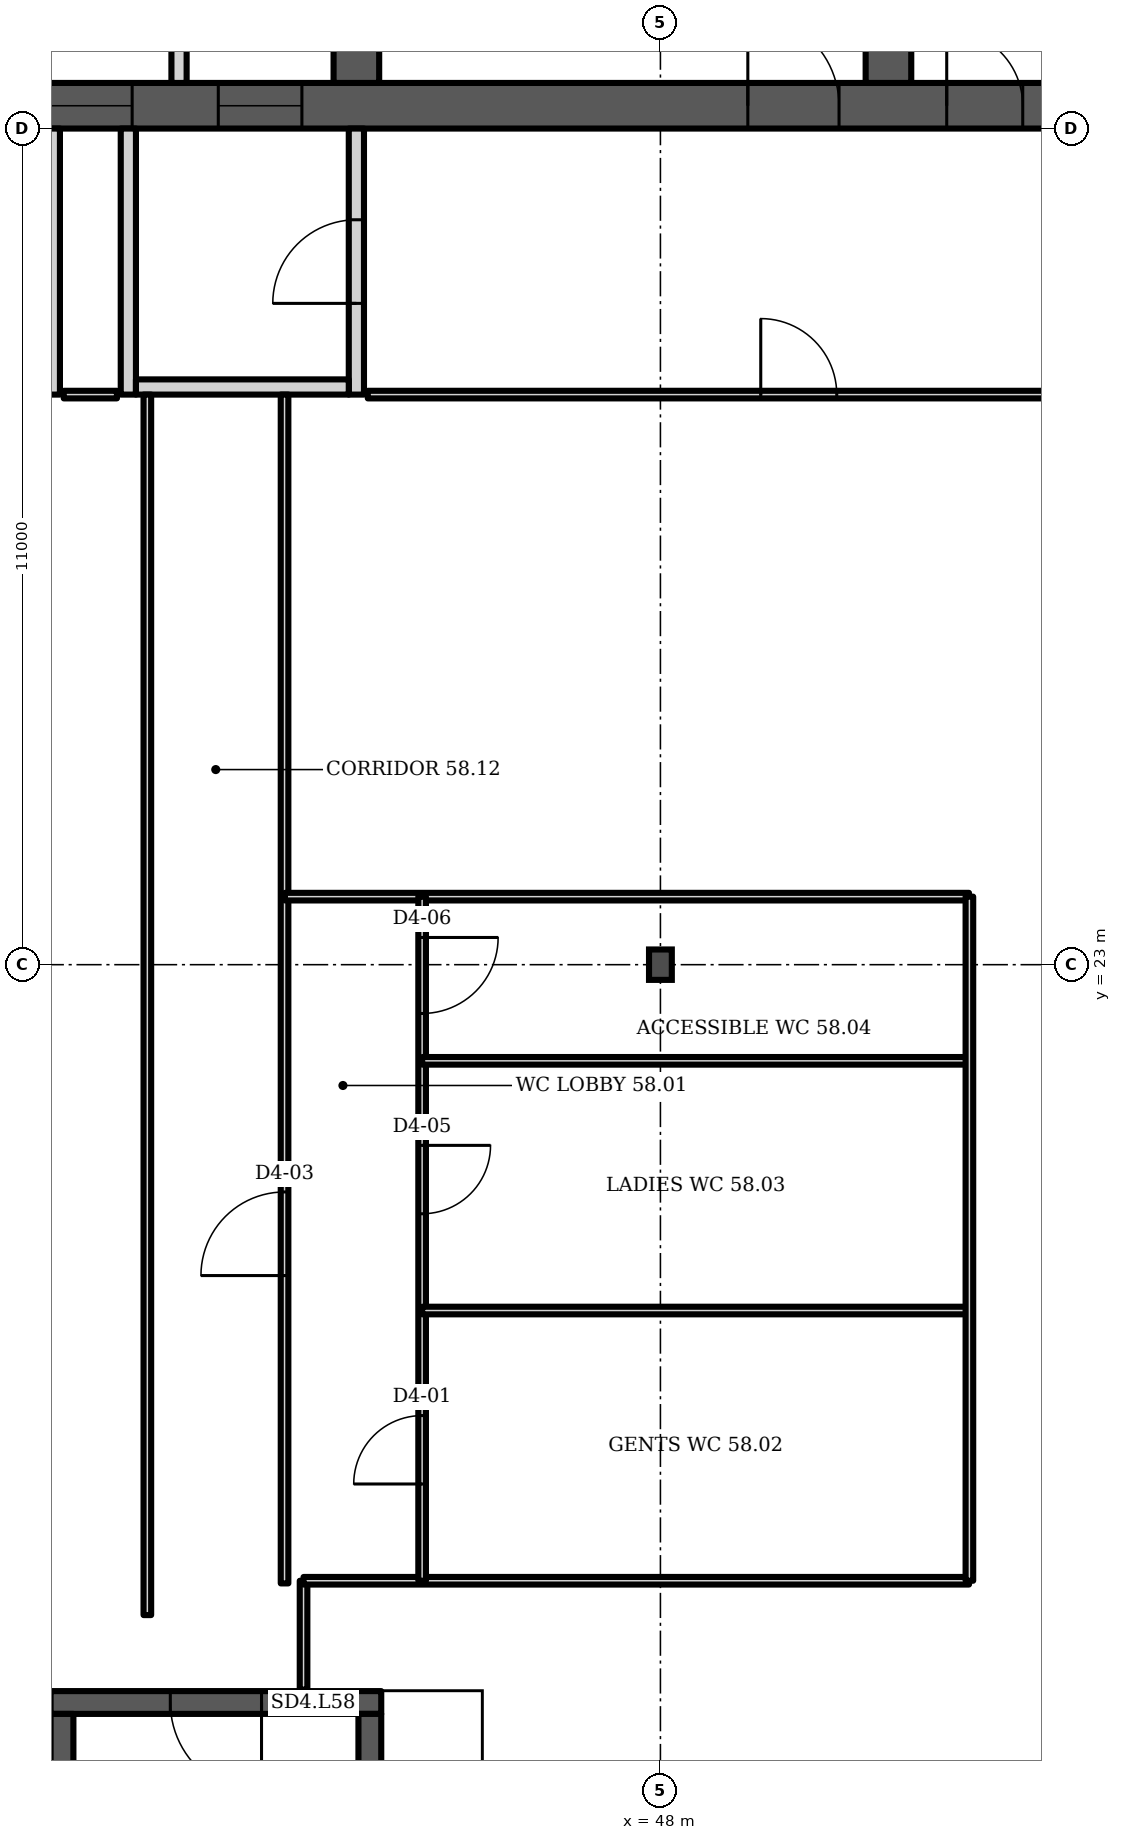
"""IFC4 building model, lengths in metres.
Left out: names, types, materials, properties, quantities, classifications, styles, units other than length and angle.
Written with IfcOpenShell. Run it as: python <this file> out.ifc"""

import sys

from ifc_helpers import new_model, si_unit, direction, frame, frame_2d, origin, origin_2d, place, context, subcontext, project, spatial, polyline, rectangle, i_section, outline, extrude, element, fill, save


model = new_model("IFC4")
c1 = context("Model", 3, precision=1e-05, world=origin(), true_north=direction((0.0, 1.0)))
c2 = subcontext(c1, "Body", "Model", "MODEL_VIEW")
j1 = project(units=[si_unit("LENGTHUNIT", "METRE"), si_unit("PLANEANGLEUNIT", "RADIAN")], contexts=[c1])
p1 = place(None, origin())
s1 = spatial("IfcSite", under=j1, at=p1, CompositionType="ELEMENT")
p2 = place(p1, origin())
s2 = spatial("IfcBuilding", under=s1, at=p2, CompositionType="ELEMENT")
p3 = place(p2, frame((0.0, 0.0, 232.3)))
s3 = spatial("IfcBuildingStorey", under=s2, at=p3, CompositionType="ELEMENT", Elevation=232.3)
p4 = place(p3, frame((23.0, 34.3, 0.0), z_axis=(0.0, 0.0, 1.0), x_axis=(1.0, 0.0, 0.0)))
e1 = element("IfcWall", 1, at=p4, inside=s3, PredefinedType="SHEAR", context=c2, shape_type="SweptSolid", body=[
    extrude(rectangle(XDim=35.0, YDim=0.6, at=frame_2d((17.5, 0.0))), origin(), (0.0, 0.0, 1.0), 3.6),
])
p5 = place(p4, frame((0.65, 0.0, 0.0)))
e2 = element("IfcOpeningElement", 2, at=p5, cuts=e1, PredefinedType="OPENING", context=c2, shape_type="SweptSolid", body=[
    extrude(rectangle(XDim=1.2, YDim=2.1, at=frame_2d((0.6, 1.05))), frame((0.0, 0.31, 0.0), z_axis=(0.0, -1.0, 0.0), x_axis=(1.0, 0.0, 0.0)), (0.0, 0.0, 1.0), 0.62),
])
p6 = place(p4, frame((7.717, 0.0, 0.0)))
e3 = element("IfcOpeningElement", 3, at=p6, cuts=e1, PredefinedType="OPENING", context=c2, shape_type="SweptSolid", body=[
    extrude(rectangle(XDim=1.1, YDim=2.1, at=frame_2d((0.55, 1.05))), frame((0.0, 0.31, 0.0), z_axis=(0.0, -1.0, 0.0), x_axis=(1.0, 0.0, 0.0)), (0.0, 0.0, 1.0), 0.62),
])
p7 = place(p4, frame((12.183, 0.0, 0.0)))
e4 = element("IfcOpeningElement", 4, at=p7, cuts=e1, PredefinedType="OPENING", context=c2, shape_type="SweptSolid", body=[
    extrude(rectangle(XDim=1.1, YDim=2.1, at=frame_2d((0.55, 1.05))), frame((0.0, 0.31, 0.0), z_axis=(0.0, -1.0, 0.0), x_axis=(1.0, 0.0, 0.0)), (0.0, 0.0, 1.0), 0.62),
])
p8 = place(p4, frame((9.8, 0.0, 0.0)))
e5 = element("IfcOpeningElement", 5, at=p8, cuts=e1, PredefinedType="OPENING", context=c2, shape_type="SweptSolid", body=[
    extrude(rectangle(XDim=1.4, YDim=2.1, at=frame_2d((0.7, 1.05))), frame((0.0, 0.31, 0.0), z_axis=(0.0, -1.0, 0.0), x_axis=(1.0, 0.0, 0.0)), (0.0, 0.0, 1.0), 0.62),
])
p9 = place(p4, frame((14.717, 0.0, 0.0)))
e6 = element("IfcOpeningElement", 6, at=p9, cuts=e1, PredefinedType="OPENING", context=c2, shape_type="SweptSolid", body=[
    extrude(rectangle(XDim=1.1, YDim=2.1, at=frame_2d((0.55, 1.05))), frame((0.0, 0.31, 0.0), z_axis=(0.0, -1.0, 0.0), x_axis=(1.0, 0.0, 0.0)), (0.0, 0.0, 1.0), 0.62),
])
p10 = place(p4, frame((16.95, 0.0, 0.0)))
e7 = element("IfcOpeningElement", 7, at=p10, cuts=e1, PredefinedType="OPENING", context=c2, shape_type="SweptSolid", body=[
    extrude(rectangle(XDim=1.1, YDim=2.1, at=frame_2d((0.55, 1.05))), frame((0.0, 0.31, 0.0), z_axis=(0.0, -1.0, 0.0), x_axis=(1.0, 0.0, 0.0)), (0.0, 0.0, 1.0), 0.62),
])
p11 = place(p4, frame((19.183, 0.0, 0.0)))
e8 = element("IfcOpeningElement", 8, at=p11, cuts=e1, PredefinedType="OPENING", context=c2, shape_type="SweptSolid", body=[
    extrude(rectangle(XDim=1.1, YDim=2.1, at=frame_2d((0.55, 1.05))), frame((0.0, 0.31, 0.0), z_axis=(0.0, -1.0, 0.0), x_axis=(1.0, 0.0, 0.0)), (0.0, 0.0, 1.0), 0.62),
])
p12 = place(p4, frame((26.15, 0.0, 0.0)))
e9 = element("IfcOpeningElement", 9, at=p12, cuts=e1, PredefinedType="OPENING", context=c2, shape_type="SweptSolid", body=[
    extrude(rectangle(XDim=1.2, YDim=2.1, at=frame_2d((0.6, 1.05))), frame((0.0, 0.31, 0.0), z_axis=(0.0, -1.0, 0.0), x_axis=(1.0, 0.0, 0.0)), (0.0, 0.0, 1.0), 0.62),
])
p13 = place(p4, frame((28.767, 0.0, 0.0)))
e10 = element("IfcOpeningElement", 10, at=p13, cuts=e1, PredefinedType="OPENING", context=c2, shape_type="SweptSolid", body=[
    extrude(rectangle(XDim=1.0, YDim=2.1, at=frame_2d((0.5, 1.05))), frame((0.0, 0.31, 0.0), z_axis=(0.0, -1.0, 0.0), x_axis=(1.0, 0.0, 0.0)), (0.0, 0.0, 1.0), 0.62),
])
p14 = place(p4, frame((33.083, 0.0, 0.0)))
e11 = element("IfcOpeningElement", 11, at=p14, cuts=e1, PredefinedType="OPENING", context=c2, shape_type="SweptSolid", body=[
    extrude(rectangle(XDim=1.0, YDim=2.1, at=frame_2d((0.5, 1.05))), frame((0.0, 0.31, 0.0), z_axis=(0.0, -1.0, 0.0), x_axis=(1.0, 0.0, 0.0)), (0.0, 0.0, 1.0), 0.62),
])
p15 = place(p4, frame((30.8, 0.0, 0.0)))
e12 = element("IfcOpeningElement", 12, at=p15, cuts=e1, PredefinedType="OPENING", context=c2, shape_type="SweptSolid", body=[
    extrude(rectangle(XDim=1.4, YDim=2.1, at=frame_2d((0.7, 1.05))), frame((0.0, 0.31, 0.0), z_axis=(0.0, -1.0, 0.0), x_axis=(1.0, 0.0, 0.0)), (0.0, 0.0, 1.0), 0.62),
])
p16 = place(p3, frame((44.0, 34.6, 0.0), z_axis=(0.0, 0.0, 1.0), x_axis=(0.0, 1.0, 0.0)))
e13 = element("IfcWall", 13, at=p16, inside=s3, PredefinedType="SHEAR", context=c2, shape_type="SweptSolid", body=[
    extrude(rectangle(XDim=14.784, YDim=0.6, at=frame_2d((7.392, 0.0))), origin(), (0.0, 0.0, 1.0), 3.6),
])
p17 = place(p16, frame((11.608, 0.0, 0.0)))
e14 = element("IfcOpeningElement", 14, at=p17, cuts=e13, PredefinedType="OPENING", context=c2, shape_type="SweptSolid", body=[
    extrude(rectangle(XDim=1.0, YDim=2.1, at=frame_2d((0.5, 1.05))), frame((0.0, 0.31, 0.0), z_axis=(0.0, -1.0, 0.0), x_axis=(1.0, 0.0, 0.0)), (0.0, 0.0, 1.0), 0.62),
])
p18 = place(p16, frame((3.8, 0.0, 0.0)))
e15 = element("IfcOpeningElement", 15, at=p18, cuts=e13, PredefinedType="OPENING", context=c2, shape_type="SweptSolid", body=[
    extrude(rectangle(XDim=1.1, YDim=2.1, at=frame_2d((0.55, 1.05))), frame((0.0, 0.31, 0.0), z_axis=(0.0, -1.0, 0.0), x_axis=(1.0, 0.0, 0.0)), (0.0, 0.0, 1.0), 0.62),
])
p19 = place(p3, frame((51.0, 34.6, 0.0), z_axis=(0.0, 0.0, 1.0), x_axis=(0.0, 1.0, 0.0)))
e16 = element("IfcWall", 16, at=p19, inside=s3, PredefinedType="SHEAR", context=c2, shape_type="SweptSolid", body=[
    extrude(rectangle(XDim=14.171, YDim=0.6, at=frame_2d((7.085, 0.0))), origin(), (0.0, 0.0, 1.0), 3.6),
])
p20 = place(p19, frame((3.8, 0.0, 0.0)))
e17 = element("IfcOpeningElement", 17, at=p20, cuts=e16, PredefinedType="OPENING", context=c2, shape_type="SweptSolid", body=[
    extrude(rectangle(XDim=1.1, YDim=2.1, at=frame_2d((0.55, 1.05))), frame((0.0, 0.31, 0.0), z_axis=(0.0, -1.0, 0.0), x_axis=(1.0, 0.0, 0.0)), (0.0, 0.0, 1.0), 0.62),
])
p21 = place(p3, frame((48.0, 23.0, 0.0), z_axis=(0.0, 0.0, 1.0), x_axis=(1.0, 0.0, 0.0)))
e18 = element("IfcColumn", 18, at=p21, inside=s3, PredefinedType="COLUMN", context=c2, shape_type="SweptSolid", body=[
    extrude(i_section(OverallWidth=0.3, OverallDepth=0.4, WebThickness=0.013, FlangeThickness=0.024, FilletRadius=0.027, at=origin_2d()), origin(), (0.0, 0.0, 1.0), 3.6),
])
p22 = place(p3, frame((0.0, 0.0, -0.0)))
e19 = element("IfcWall", 19, at=p22, inside=s3, PredefinedType="PARTITIONING", context=c2, shape_type="SweptSolid", body=[
    extrude(outline(polyline([(41.567, 37.1), (39.433, 37.1), (39.433, 34.6), (39.233, 34.6), (39.233, 37.45), (37.3, 37.45), (37.3, 37.65), (39.233, 37.65), (39.433, 37.65), (39.433, 37.3), (41.567, 37.3), (41.567, 37.35), (41.767, 37.35), (43.7, 37.35), (43.7, 37.15), (41.767, 37.15), (41.767, 34.6), (41.567, 34.6), (41.567, 37.1)])), origin(), (0.0, 0.0, 1.0), 3.2),
])
for number, where, z_axis, x_axis in (
    (20, (40.0, 30.5, 0.0), (0.0, 0.0, 1.0), (0.0, 1.0, 0.0)),
    (21, (41.0, 30.5, 0.0), (0.0, 0.0, 1.0), (0.0, 1.0, 0.0)),
):
    element("IfcWall", number, at=place(p3, frame(where, z_axis=z_axis, x_axis=x_axis)), inside=s3, PredefinedType="PARTITIONING", context=c2, shape_type="SweptSolid", body=[
        extrude(rectangle(XDim=3.5, YDim=0.2, at=frame_2d((1.75, 0.0))), origin(), (0.0, 0.0, 1.0), 3.2),
    ])
p23 = place(p3, frame((44.0, 30.5, 0.0), z_axis=(0.0, 0.0, 1.0), x_axis=(0.0, 1.0, 0.0)))
e22 = element("IfcWall", 22, at=p23, inside=s3, PredefinedType="PARTITIONING", context=c2, shape_type="SweptSolid", body=[
    extrude(rectangle(XDim=3.5, YDim=0.2, at=frame_2d((1.75, 0.0))), origin(), (0.0, 0.0, 1.0), 3.2),
])
p24 = place(p23, frame((1.2, 0.0, 0.0)))
e23 = element("IfcOpeningElement", 23, at=p24, cuts=e22, PredefinedType="OPENING", context=c2, shape_type="SweptSolid", body=[
    extrude(rectangle(XDim=1.1, YDim=2.1, at=frame_2d((0.55, 1.05))), frame((0.0, 0.11, 0.0), z_axis=(0.0, -1.0, 0.0), x_axis=(1.0, 0.0, 0.0)), (0.0, 0.0, 1.0), 0.22),
])
p25 = place(p3, frame((41.1, 30.6, 0.0), z_axis=(0.0, 0.0, 1.0), x_axis=(1.0, 0.0, 0.0)))
e24 = element("IfcWall", 24, at=p25, inside=s3, PredefinedType="PARTITIONING", context=c2, shape_type="SweptSolid", body=[
    extrude(rectangle(XDim=2.8, YDim=0.2, at=frame_2d((1.4, 0.0))), origin(), (0.0, 0.0, 1.0), 3.2),
])
p26 = place(p3, frame((39.977, 13.293, 0.0), z_axis=(0.0, 0.0, 1.0), x_axis=(1.0, 0.0, 0.0)))
e25 = element("IfcWall", 25, at=p26, inside=s3, PredefinedType="SHEAR", context=c2, shape_type="SweptSolid", body=[
    extrude(rectangle(XDim=4.35, YDim=0.3, at=frame_2d((2.175, 0.0))), origin(), (0.0, 0.0, 1.0), 3.2),
])
p27 = place(p26, frame((1.575, 0.0, 0.0)))
e26 = element("IfcOpeningElement", 26, at=p27, cuts=e25, PredefinedType="OPENING", context=c2, shape_type="SweptSolid", body=[
    extrude(rectangle(XDim=1.2, YDim=2.1, at=frame_2d((0.6, 1.05))), frame((0.0, 0.16, 0.0), z_axis=(0.0, -1.0, 0.0), x_axis=(1.0, 0.0, 0.0)), (0.0, 0.0, 1.0), 0.32),
])
p28 = place(p3, frame((41.25, 14.443, 0.0), z_axis=(0.0, 0.0, 1.0), x_axis=(0.0, 1.0, 0.0)))
e27 = element("IfcWall", 27, at=p28, inside=s3, PredefinedType="PARTITIONING", context=c2, shape_type="SweptSolid", body=[
    extrude(rectangle(XDim=16.057, YDim=0.1, at=frame_2d((8.028, 0.0))), origin(), (0.0, 0.0, 1.0), 3.2),
])
p29 = place(p3, frame((43.055, 14.86, 0.0), z_axis=(0.0, 0.0, 1.0), x_axis=(0.0, 1.0, 0.0)))
e28 = element("IfcWall", 28, at=p29, inside=s3, PredefinedType="PARTITIONING", context=c2, shape_type="SweptSolid", body=[
    extrude(rectangle(XDim=15.64, YDim=0.1, at=frame_2d((7.82, 0.0))), origin(), (0.0, 0.0, 1.0), 3.2),
])
p30 = place(p29, frame((4.05, 0.0, 0.0)))
e29 = element("IfcOpeningElement", 29, at=p30, cuts=e28, PredefinedType="OPENING", context=c2, shape_type="SweptSolid", body=[
    extrude(rectangle(XDim=1.1, YDim=2.1, at=frame_2d((0.55, 1.05))), frame((0.0, 0.06, 0.0), z_axis=(0.0, -1.0, 0.0), x_axis=(1.0, 0.0, 0.0)), (0.0, 0.0, 1.0), 0.12),
])
p31 = place(p3, frame((44.15, 30.5, 0.0), z_axis=(0.0, 0.0, 1.0), x_axis=(1.0, 0.0, 0.0)))
e30 = element("IfcWall", 30, at=p31, inside=s3, PredefinedType="PARTITIONING", context=c2, shape_type="SweptSolid", body=[
    extrude(rectangle(XDim=12.95, YDim=0.1, at=frame_2d((6.475, 0.0))), origin(), (0.0, 0.0, 1.0), 3.2),
])
p32 = place(p31, frame((5.17, 0.0, 0.0)))
e31 = element("IfcOpeningElement", 31, at=p32, cuts=e30, PredefinedType="OPENING", context=c2, shape_type="SweptSolid", body=[
    extrude(rectangle(XDim=1.0, YDim=2.1, at=frame_2d((0.5, 1.05))), frame((0.0, 0.06, 0.0), z_axis=(0.0, -1.0, 0.0), x_axis=(1.0, 0.0, 0.0)), (0.0, 0.0, 1.0), 0.12),
])
p33 = place(p3, frame((43.06, 23.895, 0.0), z_axis=(0.0, 0.0, 1.0), x_axis=(1.0, 0.0, 0.0)))
e32 = element("IfcWall", 32, at=p33, inside=s3, PredefinedType="PARTITIONING", context=c2, shape_type="SweptSolid", body=[
    extrude(rectangle(XDim=9.0, YDim=0.1, at=frame_2d((4.5, 0.0))), origin(), (0.0, 0.0, 1.0), 3.2),
])
p34 = place(p3, frame((43.305, 13.463, 0.0), z_axis=(0.0, 0.0, 1.0), x_axis=(0.0, 1.0, 0.0)))
e33 = element("IfcWall", 33, at=p34, inside=s3, PredefinedType="PARTITIONING", context=c2, shape_type="SweptSolid", body=[
    extrude(rectangle(XDim=1.432, YDim=0.1, at=frame_2d((0.716, 0.0))), origin(), (0.0, 0.0, 1.0), 3.2),
])
p35 = place(p3, frame((43.305, 14.895, 0.0), z_axis=(0.0, 0.0, 1.0), x_axis=(1.0, 0.0, 0.0)))
e34 = element("IfcWall", 34, at=p35, inside=s3, PredefinedType="PARTITIONING", context=c2, shape_type="SweptSolid", body=[
    extrude(rectangle(XDim=8.755, YDim=0.1, at=frame_2d((4.377, 0.0))), origin(), (0.0, 0.0, 1.0), 3.2),
])
p36 = place(p3, frame((44.865, 14.895, 0.0), z_axis=(0.0, 0.0, 1.0), x_axis=(0.0, 1.0, 0.0)))
e35 = element("IfcWall", 35, at=p36, inside=s3, PredefinedType="PARTITIONING", context=c2, shape_type="SweptSolid", body=[
    extrude(rectangle(XDim=9.0, YDim=0.1, at=frame_2d((4.5, 0.0))), origin(), (0.0, 0.0, 1.0), 3.2),
])
p37 = place(p36, frame((1.273, 0.0, 0.0)))
e36 = element("IfcOpeningElement", 36, at=p37, cuts=e35, PredefinedType="OPENING", context=c2, shape_type="SweptSolid", body=[
    extrude(rectangle(XDim=0.9, YDim=2.1, at=frame_2d((0.45, 1.05))), frame((0.0, 0.06, 0.0), z_axis=(0.0, -1.0, 0.0), x_axis=(1.0, 0.0, 0.0)), (0.0, 0.0, 1.0), 0.12),
])
p38 = place(p36, frame((4.828, 0.0, 0.0)))
e37 = element("IfcOpeningElement", 37, at=p38, cuts=e35, PredefinedType="OPENING", context=c2, shape_type="SweptSolid", body=[
    extrude(rectangle(XDim=0.9, YDim=2.1, at=frame_2d((0.45, 1.05))), frame((0.0, 0.06, 0.0), z_axis=(0.0, -1.0, 0.0), x_axis=(1.0, 0.0, 0.0)), (0.0, 0.0, 1.0), 0.12),
])
p39 = place(p36, frame((7.463, 0.0, 0.0)))
e38 = element("IfcOpeningElement", 38, at=p39, cuts=e35, PredefinedType="OPENING", context=c2, shape_type="SweptSolid", body=[
    extrude(rectangle(XDim=1.0, YDim=2.1, at=frame_2d((0.5, 1.05))), frame((0.0, 0.06, 0.0), z_axis=(0.0, -1.0, 0.0), x_axis=(1.0, 0.0, 0.0)), (0.0, 0.0, 1.0), 0.12),
])
for number, where, z_axis, x_axis in (
    (39, (44.865, 18.45, 0.0), (0.0, 0.0, 1.0), (1.0, 0.0, 0.0)),
    (40, (44.865, 21.735, 0.0), (0.0, 0.0, 1.0), (1.0, 0.0, 0.0)),
):
    element("IfcWall", number, at=place(p3, frame(where, z_axis=z_axis, x_axis=x_axis)), inside=s3, PredefinedType="PARTITIONING", context=c2, shape_type="SweptSolid", body=[
        extrude(rectangle(XDim=7.195, YDim=0.1, at=frame_2d((3.598, 0.0))), origin(), (0.0, 0.0, 1.0), 3.2),
    ])
p40 = place(p3, frame((52.065, 14.895, 0.0), z_axis=(0.0, 0.0, 1.0), x_axis=(0.0, 1.0, 0.0)))
e41 = element("IfcWall", 41, at=p40, inside=s3, PredefinedType="PARTITIONING", context=c2, shape_type="SweptSolid", body=[
    extrude(rectangle(XDim=9.0, YDim=0.1, at=frame_2d((4.5, 0.0))), origin(), (0.0, 0.0, 1.0), 3.2),
])
p41 = place(p3, frame((40.15, 30.5, 0.0), z_axis=(0.0, 0.0, 1.0), x_axis=(1.0, 0.0, 0.0)))
e42 = element("IfcWall", 42, at=p41, inside=s3, PredefinedType="PARTITIONING", context=c2, shape_type="SweptSolid", body=[
    extrude(rectangle(XDim=0.7, YDim=0.1, at=frame_2d((0.35, 0.0))), origin(), (0.0, 0.0, 1.0), 3.2),
])
for number, where, z_axis, x_axis in (
    (43, (40.127, 5.643, 0.0), (0.0, 0.0, 1.0), (0.0, 1.0, 0.0)),
    (44, (44.177, 5.643, 0.0), (0.0, 0.0, 1.0), (0.0, 1.0, 0.0)),
):
    element("IfcWall", number, at=place(p3, frame(where, z_axis=z_axis, x_axis=x_axis)), inside=s3, PredefinedType="SHEAR", context=c2, shape_type="SweptSolid", body=[
        extrude(rectangle(XDim=7.5, YDim=0.3, at=frame_2d((3.75, 0.0))), origin(), (0.0, 0.0, 1.0), 3.2),
    ])
p42 = place(p10, origin())
e45 = element("IfcDoor", 45, at=p42, inside=s3, OperationType="DOUBLE_DOOR_SLIDING", PredefinedType="DOOR", context=c2, shape_type="SweptSolid", body=[
    extrude(rectangle(XDim=1.1, YDim=2.1, at=frame_2d((0.55, 1.05))), frame((0.0, 0.025, 0.0), z_axis=(0.0, -1.0, 0.0), x_axis=(1.0, 0.0, 0.0)), (0.0, 0.0, 1.0), 0.05),
])
fill(e7, e45)
p43 = place(p11, origin())
e46 = element("IfcDoor", 46, at=p43, inside=s3, OperationType="DOUBLE_DOOR_SLIDING", PredefinedType="DOOR", context=c2, shape_type="SweptSolid", body=[
    extrude(rectangle(XDim=1.1, YDim=2.1, at=frame_2d((0.55, 1.05))), frame((0.0, 0.025, 0.0), z_axis=(0.0, -1.0, 0.0), x_axis=(1.0, 0.0, 0.0)), (0.0, 0.0, 1.0), 0.05),
])
fill(e8, e46)
p44 = place(p12, origin())
e47 = element("IfcDoor", 47, at=p44, inside=s3, OperationType="SINGLE_SWING_LEFT", PredefinedType="DOOR", context=c2, shape_type="SweptSolid", body=[
    extrude(rectangle(XDim=1.2, YDim=2.1, at=frame_2d((0.6, 1.05))), frame((0.0, 0.025, 0.0), z_axis=(0.0, -1.0, 0.0), x_axis=(1.0, 0.0, 0.0)), (0.0, 0.0, 1.0), 0.05),
])
fill(e9, e47)
p45 = place(p13, origin())
e48 = element("IfcDoor", 48, at=p45, inside=s3, OperationType="SINGLE_SWING_LEFT", PredefinedType="DOOR", context=c2, shape_type="SweptSolid", body=[
    extrude(rectangle(XDim=1.0, YDim=2.1, at=frame_2d((0.5, 1.05))), frame((0.0, 0.025, 0.0), z_axis=(0.0, -1.0, 0.0), x_axis=(1.0, 0.0, 0.0)), (0.0, 0.0, 1.0), 0.05),
])
fill(e10, e48)
p46 = place(p24, origin())
e49 = element("IfcDoor", 49, at=p46, inside=s3, OperationType="SINGLE_SWING_LEFT", PredefinedType="DOOR", context=c2, shape_type="SweptSolid", body=[
    extrude(rectangle(XDim=1.1, YDim=2.1, at=frame_2d((0.55, 1.05))), frame((0.0, 0.025, 0.0), z_axis=(0.0, -1.0, 0.0), x_axis=(1.0, 0.0, 0.0)), (0.0, 0.0, 1.0), 0.05),
])
fill(e23, e49)
p47 = place(p27, origin())
e50 = element("IfcDoor", 50, at=p47, inside=s3, OperationType="SINGLE_SWING_RIGHT", PredefinedType="DOOR", context=c2, shape_type="SweptSolid", body=[
    extrude(rectangle(XDim=1.2, YDim=2.1, at=frame_2d((0.6, 1.05))), frame((0.0, 0.025, 0.0), z_axis=(0.0, -1.0, 0.0), x_axis=(1.0, 0.0, 0.0)), (0.0, 0.0, 1.0), 0.05),
])
fill(e26, e50)
p48 = place(p37, origin())
e51 = element("IfcDoor", 51, at=p48, inside=s3, OperationType="SINGLE_SWING_LEFT", PredefinedType="DOOR", context=c2, shape_type="SweptSolid", body=[
    extrude(rectangle(XDim=0.9, YDim=2.1, at=frame_2d((0.45, 1.05))), frame((0.0, 0.025, 0.0), z_axis=(0.0, -1.0, 0.0), x_axis=(1.0, 0.0, 0.0)), (0.0, 0.0, 1.0), 0.05),
])
fill(e36, e51)
p49 = place(p30, origin())
e52 = element("IfcDoor", 52, at=p49, inside=s3, OperationType="SINGLE_SWING_LEFT", PredefinedType="DOOR", context=c2, shape_type="SweptSolid", body=[
    extrude(rectangle(XDim=1.1, YDim=2.1, at=frame_2d((0.55, 1.05))), frame((0.0, 0.025, 0.0), z_axis=(0.0, -1.0, 0.0), x_axis=(1.0, 0.0, 0.0)), (0.0, 0.0, 1.0), 0.05),
])
fill(e29, e52)
p50 = place(p38, origin())
e53 = element("IfcDoor", 53, at=p50, inside=s3, OperationType="SINGLE_SWING_RIGHT", PredefinedType="DOOR", context=c2, shape_type="SweptSolid", body=[
    extrude(rectangle(XDim=0.9, YDim=2.1, at=frame_2d((0.45, 1.05))), frame((0.0, 0.025, 0.0), z_axis=(0.0, -1.0, 0.0), x_axis=(1.0, 0.0, 0.0)), (0.0, 0.0, 1.0), 0.05),
])
fill(e37, e53)
p51 = place(p39, origin())
e54 = element("IfcDoor", 54, at=p51, inside=s3, OperationType="SINGLE_SWING_RIGHT", PredefinedType="DOOR", context=c2, shape_type="SweptSolid", body=[
    extrude(rectangle(XDim=1.0, YDim=2.1, at=frame_2d((0.5, 1.05))), frame((0.0, 0.025, 0.0), z_axis=(0.0, -1.0, 0.0), x_axis=(1.0, 0.0, 0.0)), (0.0, 0.0, 1.0), 0.05),
])
fill(e38, e54)
p52 = place(p32, origin())
e55 = element("IfcDoor", 55, at=p52, inside=s3, OperationType="SINGLE_SWING_LEFT", PredefinedType="DOOR", context=c2, shape_type="SweptSolid", body=[
    extrude(rectangle(XDim=1.0, YDim=2.1, at=frame_2d((0.5, 1.05))), frame((0.0, 0.025, 0.0), z_axis=(0.0, -1.0, 0.0), x_axis=(1.0, 0.0, 0.0)), (0.0, 0.0, 1.0), 0.05),
])
fill(e31, e55)
save(model, sys.argv[1])
